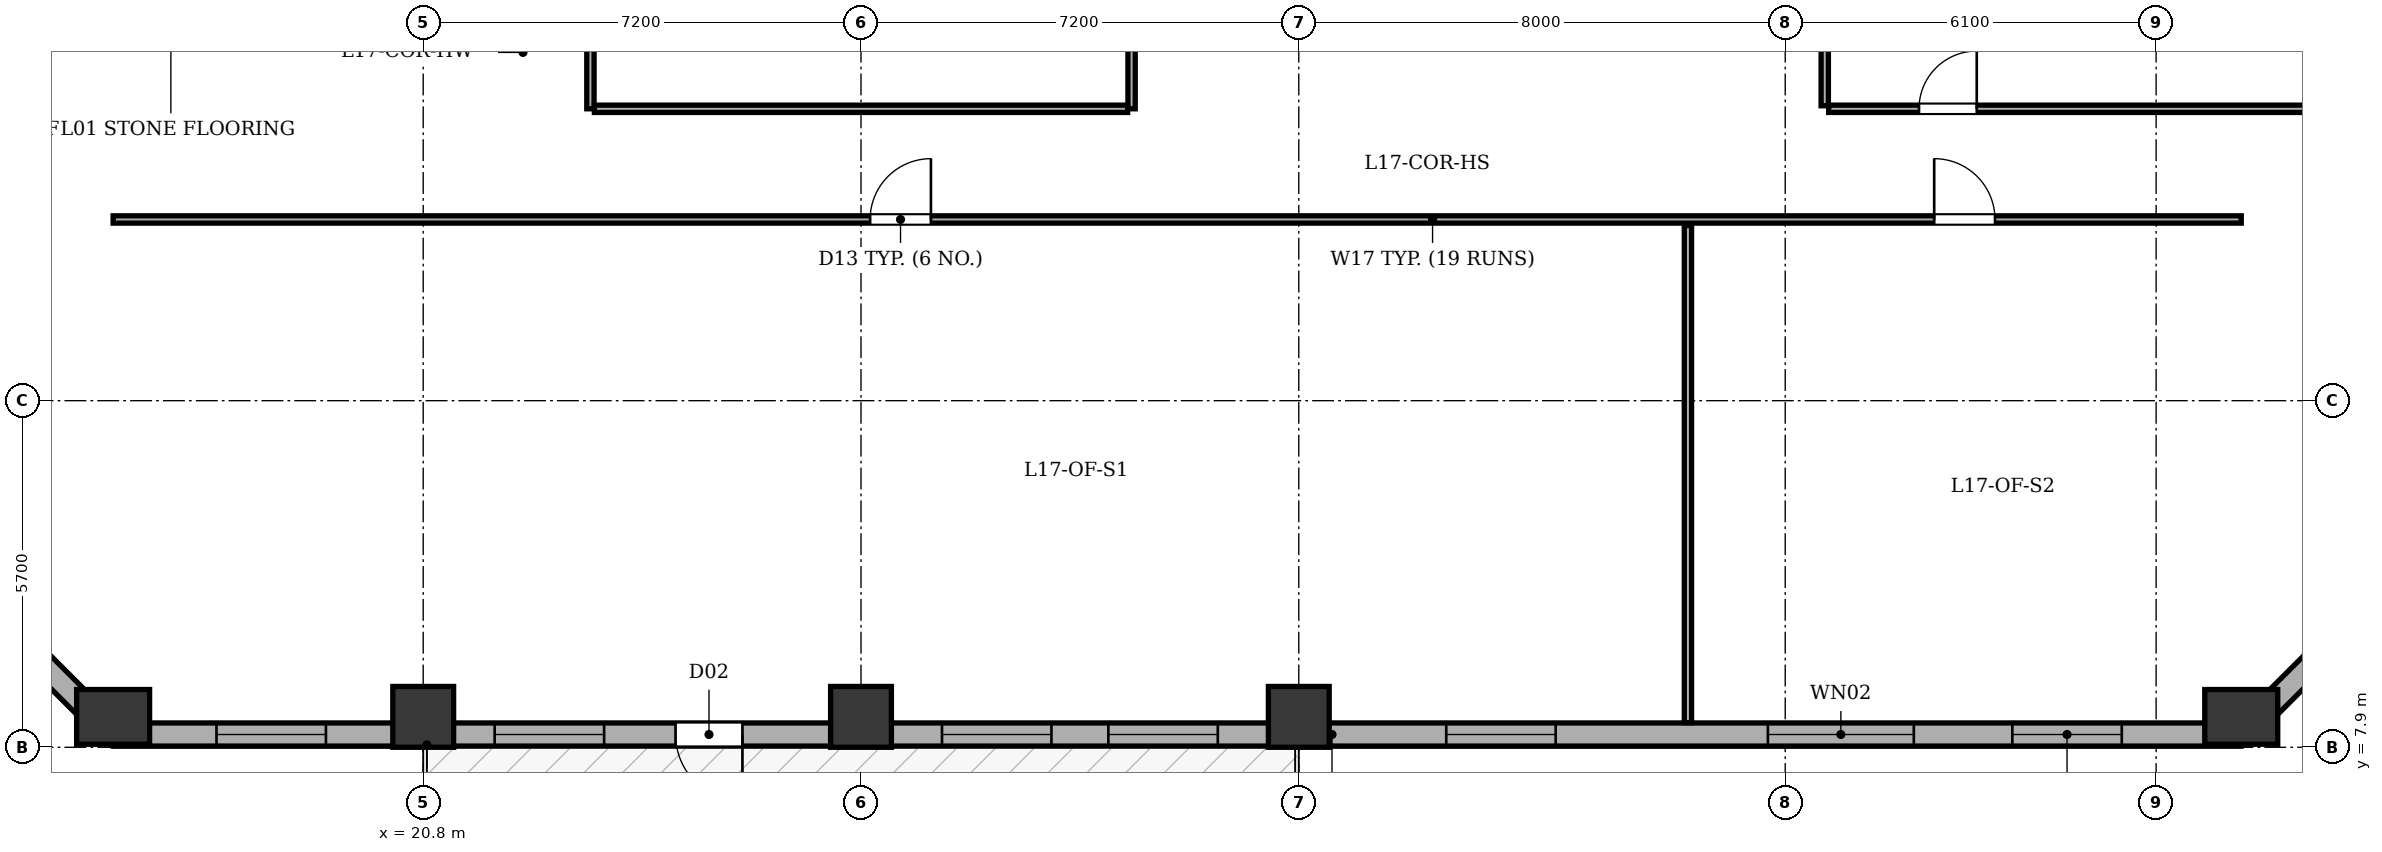
"""IFC4 building model, lengths in metres.
Left out: names, types, materials, properties, quantities, classifications, styles, units other than length and angle.
Written with IfcOpenShell. Run it as: python <this file> out.ifc"""

import sys

from ifc_helpers import new_model, si_unit, direction, frame, frame_2d, origin, origin_2d, place, context, subcontext, project, spatial, rectangle, extrude, element, fill, save


model = new_model("IFC4")
c1 = context("Model", 3, precision=1e-05, world=origin(), true_north=direction((0.0, 1.0)))
c2 = subcontext(c1, "Body", "Model", "MODEL_VIEW")
j1 = project(units=[si_unit("LENGTHUNIT", "METRE"), si_unit("PLANEANGLEUNIT", "RADIAN")], contexts=[c1])
p1 = place(None, origin())
s1 = spatial("IfcSite", under=j1, at=p1, CompositionType="ELEMENT")
p2 = place(p1, origin())
s2 = spatial("IfcBuilding", under=s1, at=p2, CompositionType="ELEMENT")
p3 = place(p2, frame((0.0, 0.0, 71.1)))
s3 = spatial("IfcBuildingStorey", under=s2, at=p3, CompositionType="ELEMENT", Elevation=71.1)
p4 = place(p3, frame((15.7, 8.4, 0.0), z_axis=(0.0, 0.0, 1.0), x_axis=(1.0, 0.0, 0.0)))
e1 = element("IfcColumn", 1, at=p4, inside=s3, PredefinedType="COLUMN", context=c2, shape_type="SweptSolid", body=[
    extrude(rectangle(XDim=0.9, YDim=1.2, at=origin_2d()), origin(), (0.0, 0.0, 1.0), 3.9),
])
for number, where, z_axis, x_axis in (
    (2, (20.8, 8.4, 0.0), (0.0, 0.0, 1.0), (1.0, 0.0, 0.0)),
    (3, (28.0, 8.4, 0.0), (0.0, 0.0, 1.0), (1.0, 0.0, 0.0)),
    (4, (35.2, 8.4, 0.0), (0.0, 0.0, 1.0), (1.0, 0.0, 0.0)),
):
    element("IfcColumn", number, at=place(p3, frame(where, z_axis=z_axis, x_axis=x_axis)), inside=s3, PredefinedType="COLUMN", context=c2, shape_type="SweptSolid", body=[
        extrude(rectangle(XDim=1.0, YDim=1.0, at=origin_2d()), origin(), (0.0, 0.0, 1.0), 3.9),
    ])
p5 = place(p3, frame((50.7, 8.4, 0.0), z_axis=(0.0, 0.0, 1.0), x_axis=(1.0, 0.0, 0.0)))
e5 = element("IfcColumn", 5, at=p5, inside=s3, PredefinedType="COLUMN", context=c2, shape_type="SweptSolid", body=[
    extrude(rectangle(XDim=0.9, YDim=1.2, at=origin_2d()), origin(), (0.0, 0.0, 1.0), 3.9),
])
p6 = place(p3, frame((50.7, 8.11, 0.0), z_axis=(0.0, 0.0, 1.0), x_axis=(-1.0, 0.0, 0.0)))
e6 = element("IfcWall", 6, at=p6, inside=s3, PredefinedType="STANDARD", context=c2, shape_type="SweptSolid", body=[
    extrude(rectangle(XDim=35.0, YDim=0.38, at=frame_2d((17.5, 0.0))), origin(), (0.0, 0.0, 1.0), 3.135),
])
p7 = place(p6, frame((24.65, 0.0, 0.0)))
e7 = element("IfcOpeningElement", 7, at=p7, cuts=e6, PredefinedType="OPENING", context=c2, shape_type="SweptSolid", body=[
    extrude(rectangle(XDim=1.1, YDim=2.05, at=frame_2d((0.55, 1.025))), frame((0.0, 0.2, 0.0), z_axis=(0.0, -1.0, 0.0), x_axis=(1.0, 0.0, 0.0)), (0.0, 0.0, 1.0), 0.4),
])
p8 = place(p6, frame((1.965, 0.0, 0.8)))
e8 = element("IfcOpeningElement", 8, at=p8, cuts=e6, PredefinedType="OPENING", context=c2, shape_type="SweptSolid", body=[
    extrude(rectangle(XDim=1.8, YDim=1.9, at=frame_2d((0.9, 0.95))), frame((0.0, 0.2, 0.0), z_axis=(0.0, -1.0, 0.0), x_axis=(1.0, 0.0, 0.0)), (0.0, 0.0, 1.0), 0.4),
])
p9 = place(p6, frame((5.385, 0.0, 0.8)))
e9 = element("IfcOpeningElement", 9, at=p9, cuts=e6, PredefinedType="OPENING", context=c2, shape_type="SweptSolid", body=[
    extrude(rectangle(XDim=2.4, YDim=1.9, at=frame_2d((1.2, 0.95))), frame((0.0, 0.2, 0.0), z_axis=(0.0, -1.0, 0.0), x_axis=(1.0, 0.0, 0.0)), (0.0, 0.0, 1.0), 0.4),
])
p10 = place(p6, frame((11.275, 0.0, 0.8)))
e10 = element("IfcOpeningElement", 10, at=p10, cuts=e6, PredefinedType="OPENING", context=c2, shape_type="SweptSolid", body=[
    extrude(rectangle(XDim=1.8, YDim=1.9, at=frame_2d((0.9, 0.95))), frame((0.0, 0.2, 0.0), z_axis=(0.0, -1.0, 0.0), x_axis=(1.0, 0.0, 0.0)), (0.0, 0.0, 1.0), 0.4),
])
p11 = place(p6, frame((16.832, 0.0, 0.8)))
e11 = element("IfcOpeningElement", 11, at=p11, cuts=e6, PredefinedType="OPENING", context=c2, shape_type="SweptSolid", body=[
    extrude(rectangle(XDim=1.8, YDim=1.9, at=frame_2d((0.9, 0.95))), frame((0.0, 0.2, 0.0), z_axis=(0.0, -1.0, 0.0), x_axis=(1.0, 0.0, 0.0)), (0.0, 0.0, 1.0), 0.4),
])
p12 = place(p6, frame((19.568, 0.0, 0.8)))
e12 = element("IfcOpeningElement", 12, at=p12, cuts=e6, PredefinedType="OPENING", context=c2, shape_type="SweptSolid", body=[
    extrude(rectangle(XDim=1.8, YDim=1.9, at=frame_2d((0.9, 0.95))), frame((0.0, 0.2, 0.0), z_axis=(0.0, -1.0, 0.0), x_axis=(1.0, 0.0, 0.0)), (0.0, 0.0, 1.0), 0.4),
])
p13 = place(p6, frame((26.925, 0.0, 0.8)))
e13 = element("IfcOpeningElement", 13, at=p13, cuts=e6, PredefinedType="OPENING", context=c2, shape_type="SweptSolid", body=[
    extrude(rectangle(XDim=1.8, YDim=1.9, at=frame_2d((0.9, 0.95))), frame((0.0, 0.2, 0.0), z_axis=(0.0, -1.0, 0.0), x_axis=(1.0, 0.0, 0.0)), (0.0, 0.0, 1.0), 0.4),
])
p14 = place(p6, frame((31.5, 0.0, 0.8)))
e14 = element("IfcOpeningElement", 14, at=p14, cuts=e6, PredefinedType="OPENING", context=c2, shape_type="SweptSolid", body=[
    extrude(rectangle(XDim=1.8, YDim=1.9, at=frame_2d((0.9, 0.95))), frame((0.0, 0.2, 0.0), z_axis=(0.0, -1.0, 0.0), x_axis=(1.0, 0.0, 0.0)), (0.0, 0.0, 1.0), 0.4),
])
p15 = place(p3, frame((15.7, 8.11, 0.0), z_axis=(0.0, 0.0, 1.0), x_axis=(-0.707124801467, 0.707088760447, 0.0)))
e15 = element("IfcWall", 15, at=p15, inside=s3, PredefinedType="STANDARD", context=c2, shape_type="SweptSolid", body=[
    extrude(rectangle(XDim=6.774, YDim=0.38, at=frame_2d((3.387, 0.0))), origin(), (0.0, 0.0, 1.0), 3.135),
])
p16 = place(p15, frame((2.687, 0.0, 0.8)))
e16 = element("IfcOpeningElement", 16, at=p16, cuts=e15, PredefinedType="OPENING", context=c2, shape_type="SweptSolid", body=[
    extrude(rectangle(XDim=1.4, YDim=1.65, at=frame_2d((0.7, 0.825))), frame((0.0, 0.2, 0.0), z_axis=(0.0, -1.0, 0.0), x_axis=(1.0, 0.0, 0.0)), (0.0, 0.0, 1.0), 0.4),
])
p17 = place(p3, frame((55.49, 12.9, 0.0), z_axis=(0.0, 0.0, 1.0), x_axis=(-0.707124801467, -0.707088760447, 0.0)))
e17 = element("IfcWall", 17, at=p17, inside=s3, PredefinedType="STANDARD", context=c2, shape_type="SweptSolid", body=[
    extrude(rectangle(XDim=6.774, YDim=0.38, at=frame_2d((3.387, 0.0))), origin(), (0.0, 0.0, 1.0), 3.135),
])
p18 = place(p17, frame((2.687, 0.0, 0.8)))
e18 = element("IfcOpeningElement", 18, at=p18, cuts=e17, PredefinedType="OPENING", context=c2, shape_type="SweptSolid", body=[
    extrude(rectangle(XDim=1.4, YDim=1.65, at=frame_2d((0.7, 0.825))), frame((0.0, 0.2, 0.0), z_axis=(0.0, -1.0, 0.0), x_axis=(1.0, 0.0, 0.0)), (0.0, 0.0, 1.0), 0.4),
])
for number, where, z_axis, x_axis in (
    (19, (23.55, 18.4, 0.0), (0.0, 0.0, 1.0), (0.0, 1.0, 0.0)),
    (20, (32.45, 18.4, 0.0), (0.0, 0.0, 1.0), (0.0, 1.0, 0.0)),
):
    element("IfcWall", number, at=place(p3, frame(where, z_axis=z_axis, x_axis=x_axis)), inside=s3, PredefinedType="PARTITIONING", context=c2, shape_type="SweptSolid", body=[
        extrude(rectangle(XDim=3.485, YDim=0.12, at=frame_2d((1.743, 0.0))), origin(), (0.0, 0.0, 1.0), 3.6),
    ])
p19 = place(p3, frame((23.615, 18.4, 0.0), z_axis=(0.0, 0.0, 1.0), x_axis=(1.0, 0.0, 0.0)))
e21 = element("IfcWall", 21, at=p19, inside=s3, PredefinedType="PARTITIONING", context=c2, shape_type="SweptSolid", body=[
    extrude(rectangle(XDim=8.77, YDim=0.12, at=frame_2d((4.385, 0.0))), origin(), (0.0, 0.0, 1.0), 3.6),
])
p20 = place(p3, frame((15.7, 16.58, 0.0), z_axis=(0.0, 0.0, 1.0), x_axis=(1.0, 0.0, 0.0)))
e22 = element("IfcWall", 22, at=p20, inside=s3, PredefinedType="PARTITIONING", context=c2, shape_type="SweptSolid", body=[
    extrude(rectangle(XDim=35.0, YDim=0.12, at=frame_2d((17.5, 0.0))), origin(), (0.0, 0.0, 1.0), 3.6),
])
p21 = place(p20, frame((12.45, 0.0, 0.0)))
e23 = element("IfcOpeningElement", 23, at=p21, cuts=e22, PredefinedType="OPENING", context=c2, shape_type="SweptSolid", body=[
    extrude(rectangle(XDim=1.0, YDim=2.1, at=frame_2d((0.5, 1.05))), frame((0.0, 0.07, 0.0), z_axis=(0.0, -1.0, 0.0), x_axis=(1.0, 0.0, 0.0)), (0.0, 0.0, 1.0), 0.14),
])
p22 = place(p20, frame((29.95, 0.0, 0.0)))
e24 = element("IfcOpeningElement", 24, at=p22, cuts=e22, PredefinedType="OPENING", context=c2, shape_type="SweptSolid", body=[
    extrude(rectangle(XDim=1.0, YDim=2.1, at=frame_2d((0.5, 1.05))), frame((0.0, 0.07, 0.0), z_axis=(0.0, -1.0, 0.0), x_axis=(1.0, 0.0, 0.0)), (0.0, 0.0, 1.0), 0.14),
])
p23 = place(p3, frame((41.6, 8.305, 0.0), z_axis=(0.0, 0.0, 1.0), x_axis=(0.0, 1.0, 0.0)))
e25 = element("IfcWall", 25, at=p23, inside=s3, PredefinedType="PARTITIONING", context=c2, shape_type="SweptSolid", body=[
    extrude(rectangle(XDim=8.175, YDim=0.12, at=frame_2d((4.087, 0.0))), origin(), (0.0, 0.0, 1.0), 3.6),
])
p24 = place(p3, frame((43.85, 18.45, 0.0), z_axis=(0.0, 0.0, 1.0), x_axis=(0.0, 1.0, 0.0)))
e26 = element("IfcWall", 26, at=p24, inside=s3, PredefinedType="PARTITIONING", context=c2, shape_type="SweptSolid", body=[
    extrude(rectangle(XDim=17.5, YDim=0.12, at=frame_2d((8.75, 0.0))), origin(), (0.0, 0.0, 1.0), 3.6),
])
p25 = place(p3, frame((43.915, 18.4, 0.0), z_axis=(0.0, 0.0, 1.0), x_axis=(1.0, 0.0, 0.0)))
e27 = element("IfcWall", 27, at=p25, inside=s3, PredefinedType="PARTITIONING", context=c2, shape_type="SweptSolid", body=[
    extrude(rectangle(XDim=11.38, YDim=0.12, at=frame_2d((5.69, 0.0))), origin(), (0.0, 0.0, 1.0), 3.6),
])
p26 = place(p25, frame((1.485, 0.0, 0.0)))
e28 = element("IfcOpeningElement", 28, at=p26, cuts=e27, PredefinedType="OPENING", context=c2, shape_type="SweptSolid", body=[
    extrude(rectangle(XDim=0.95, YDim=2.1, at=frame_2d((0.475, 1.05))), frame((0.0, 0.07, 0.0), z_axis=(0.0, -1.0, 0.0), x_axis=(1.0, 0.0, 0.0)), (0.0, 0.0, 1.0), 0.14),
])
p27 = place(p7, origin())
e29 = element("IfcDoor", 29, at=p27, inside=s3, OperationType="SINGLE_SWING_LEFT", PredefinedType="DOOR", context=c2, shape_type="SweptSolid", body=[
    extrude(rectangle(XDim=1.1, YDim=2.05, at=frame_2d((0.55, 1.025))), frame((0.0, 0.025, 0.0), z_axis=(0.0, -1.0, 0.0), x_axis=(1.0, 0.0, 0.0)), (0.0, 0.0, 1.0), 0.05),
])
fill(e7, e29)
p28 = place(p8, origin())
e30 = element("IfcWindow", 30, at=p28, inside=s3, PartitioningType="SINGLE_PANEL", PredefinedType="WINDOW", context=c2, shape_type="SweptSolid", body=[
    extrude(rectangle(XDim=1.8, YDim=1.9, at=frame_2d((0.9, 0.95))), frame((0.0, -0.01, 0.0), z_axis=(0.0, -1.0, 0.0), x_axis=(1.0, 0.0, 0.0)), (0.0, 0.0, 1.0), 0.06),
])
fill(e8, e30)
p29 = place(p9, origin())
e31 = element("IfcWindow", 31, at=p29, inside=s3, PartitioningType="SINGLE_PANEL", PredefinedType="WINDOW", context=c2, shape_type="SweptSolid", body=[
    extrude(rectangle(XDim=2.4, YDim=1.9, at=frame_2d((1.2, 0.95))), frame((0.0, -0.01, 0.0), z_axis=(0.0, -1.0, 0.0), x_axis=(1.0, 0.0, 0.0)), (0.0, 0.0, 1.0), 0.06),
])
fill(e9, e31)
p30 = place(p10, origin())
e32 = element("IfcWindow", 32, at=p30, inside=s3, PartitioningType="SINGLE_PANEL", PredefinedType="WINDOW", context=c2, shape_type="SweptSolid", body=[
    extrude(rectangle(XDim=1.8, YDim=1.9, at=frame_2d((0.9, 0.95))), frame((0.0, -0.01, 0.0), z_axis=(0.0, -1.0, 0.0), x_axis=(1.0, 0.0, 0.0)), (0.0, 0.0, 1.0), 0.06),
])
fill(e10, e32)
p31 = place(p11, origin())
e33 = element("IfcWindow", 33, at=p31, inside=s3, PartitioningType="SINGLE_PANEL", PredefinedType="WINDOW", context=c2, shape_type="SweptSolid", body=[
    extrude(rectangle(XDim=1.8, YDim=1.9, at=frame_2d((0.9, 0.95))), frame((0.0, -0.01, 0.0), z_axis=(0.0, -1.0, 0.0), x_axis=(1.0, 0.0, 0.0)), (0.0, 0.0, 1.0), 0.06),
])
fill(e11, e33)
p32 = place(p12, origin())
e34 = element("IfcWindow", 34, at=p32, inside=s3, PartitioningType="SINGLE_PANEL", PredefinedType="WINDOW", context=c2, shape_type="SweptSolid", body=[
    extrude(rectangle(XDim=1.8, YDim=1.9, at=frame_2d((0.9, 0.95))), frame((0.0, -0.01, 0.0), z_axis=(0.0, -1.0, 0.0), x_axis=(1.0, 0.0, 0.0)), (0.0, 0.0, 1.0), 0.06),
])
fill(e12, e34)
p33 = place(p13, origin())
e35 = element("IfcWindow", 35, at=p33, inside=s3, PartitioningType="SINGLE_PANEL", PredefinedType="WINDOW", context=c2, shape_type="SweptSolid", body=[
    extrude(rectangle(XDim=1.8, YDim=1.9, at=frame_2d((0.9, 0.95))), frame((0.0, -0.01, 0.0), z_axis=(0.0, -1.0, 0.0), x_axis=(1.0, 0.0, 0.0)), (0.0, 0.0, 1.0), 0.06),
])
fill(e13, e35)
p34 = place(p14, origin())
e36 = element("IfcWindow", 36, at=p34, inside=s3, PartitioningType="SINGLE_PANEL", PredefinedType="WINDOW", context=c2, shape_type="SweptSolid", body=[
    extrude(rectangle(XDim=1.8, YDim=1.9, at=frame_2d((0.9, 0.95))), frame((0.0, -0.01, 0.0), z_axis=(0.0, -1.0, 0.0), x_axis=(1.0, 0.0, 0.0)), (0.0, 0.0, 1.0), 0.06),
])
fill(e14, e36)
p35 = place(p21, origin())
e37 = element("IfcDoor", 37, at=p35, inside=s3, OperationType="SINGLE_SWING_RIGHT", PredefinedType="DOOR", context=c2, shape_type="SweptSolid", body=[
    extrude(rectangle(XDim=1.0, YDim=2.1, at=frame_2d((0.5, 1.05))), frame((0.0, 0.025, 0.0), z_axis=(0.0, -1.0, 0.0), x_axis=(1.0, 0.0, 0.0)), (0.0, 0.0, 1.0), 0.05),
])
fill(e23, e37)
p36 = place(p22, origin())
e38 = element("IfcDoor", 38, at=p36, inside=s3, OperationType="SINGLE_SWING_LEFT", PredefinedType="DOOR", context=c2, shape_type="SweptSolid", body=[
    extrude(rectangle(XDim=1.0, YDim=2.1, at=frame_2d((0.5, 1.05))), frame((0.0, 0.025, 0.0), z_axis=(0.0, -1.0, 0.0), x_axis=(1.0, 0.0, 0.0)), (0.0, 0.0, 1.0), 0.05),
])
fill(e24, e38)
p37 = place(p26, origin())
e39 = element("IfcDoor", 39, at=p37, inside=s3, OperationType="SINGLE_SWING_RIGHT", PredefinedType="DOOR", context=c2, shape_type="SweptSolid", body=[
    extrude(rectangle(XDim=0.95, YDim=2.1, at=frame_2d((0.475, 1.05))), frame((0.0, 0.025, 0.0), z_axis=(0.0, -1.0, 0.0), x_axis=(1.0, 0.0, 0.0)), (0.0, 0.0, 1.0), 0.05),
])
fill(e28, e39)
save(model, sys.argv[1])
